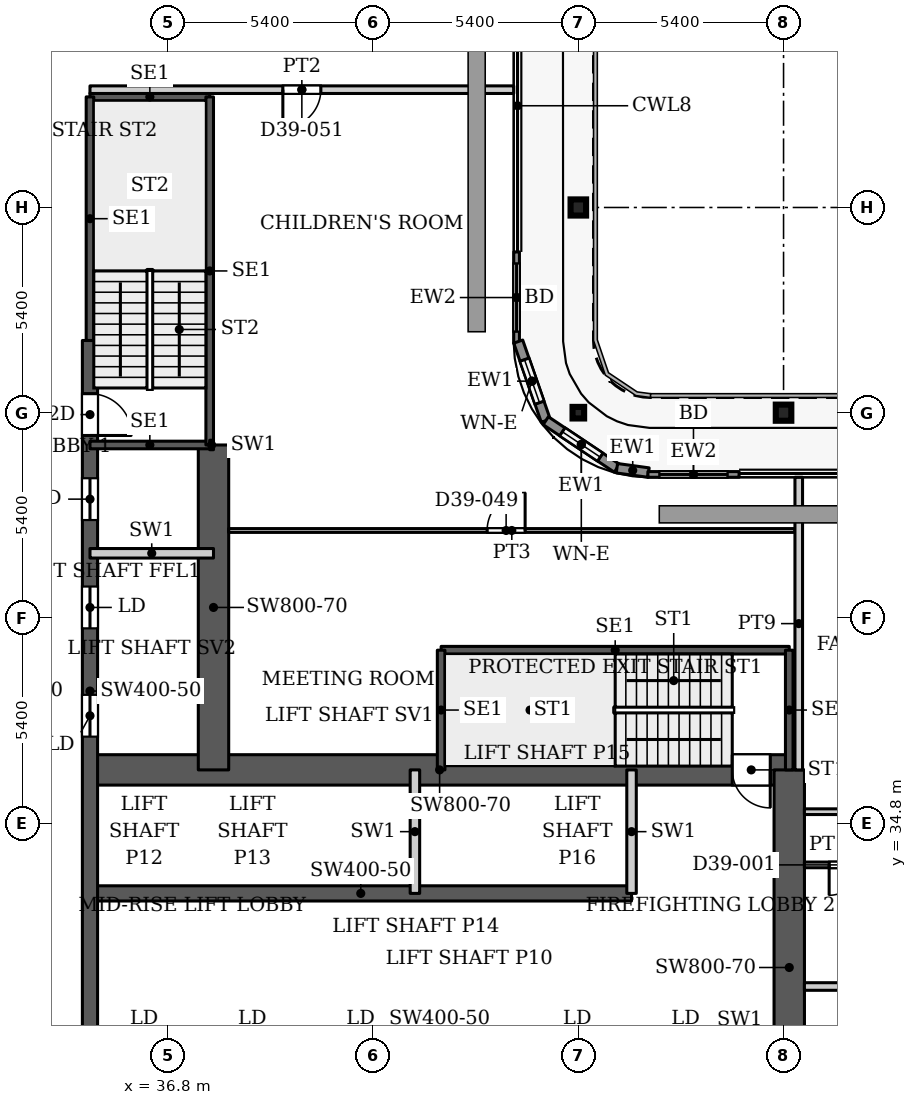
"""IFC4 building model, lengths in metres.
Left out: names, types, materials, properties, quantities, classifications, styles, units other than length and angle.
Written with IfcOpenShell. Run it as: python <this file> out.ifc"""

import sys

from ifc_helpers import new_model, si_unit, direction, frame, frame_2d, origin, origin_2d, place, context, subcontext, project, spatial, rectangle, hollow_rectangle, i_section, extrude, source, transform, mapped, element, fill, save


model = new_model("IFC4")
c1 = context("Model", 3, precision=1e-05, world=origin(), true_north=direction((0.0, 1.0)))
c2 = subcontext(c1, "Body", "Model", "MODEL_VIEW")
j1 = project(units=[si_unit("LENGTHUNIT", "METRE"), si_unit("PLANEANGLEUNIT", "RADIAN")], contexts=[c1])
p1 = place(None, origin())
s1 = spatial("IfcSite", under=j1, at=p1, CompositionType="ELEMENT")
p2 = place(p1, origin())
s2 = spatial("IfcBuilding", under=s1, at=p2, CompositionType="ELEMENT")
p3 = place(p2, frame((0.0, 0.0, 172.1)))
s3 = spatial("IfcBuildingStorey", under=s2, at=p3, CompositionType="ELEMENT", Elevation=172.1)
for number, where, z_axis, x_axis in (
    (1, (53.0, 45.6, 0.0), (0.0, 0.0, 1.0), (1.0, 0.0, 0.0)),
    (2, (47.6, 51.0, 0.0), (0.0, 0.0, 1.0), (1.0, 0.0, 0.0)),
):
    element("IfcColumn", number, at=place(p3, frame(where, z_axis=z_axis, x_axis=x_axis)), inside=s3, PredefinedType="COLUMN", context=c2, shape_type="SweptSolid", body=[
        extrude(i_section(OverallWidth=0.409, OverallDepth=0.425, WebThickness=0.033, FlangeThickness=0.052, FilletRadius=0.013, at=origin_2d()), origin(), (0.0, 0.0, 1.0), 3.9),
    ])
p4 = place(p3, frame((47.6, 45.6, 0.0), z_axis=(0.0, 0.0, 1.0), x_axis=(1.0, 0.0, 0.0)))
e3 = element("IfcColumn", 3, at=p4, inside=s3, PredefinedType="COLUMN", context=c2, shape_type="SweptSolid", body=[
    extrude(hollow_rectangle(XDim=0.305, YDim=0.305, WallThickness=0.016, InnerFilletRadius=0.016, OuterFilletRadius=0.032, at=origin_2d()), origin(), (0.0, 0.0, 1.0), 3.9),
])
p5 = place(p3, frame((34.75, 32.95, 0.0), z_axis=(0.0, 0.0, 1.0), x_axis=(1.0, 0.0, 0.0)))
e4 = element("IfcWall", 4, at=p5, inside=s3, PredefinedType="SHEAR", context=c2, shape_type="SweptSolid", body=[
    extrude(rectangle(XDim=14.25, YDim=0.4, at=frame_2d((7.125, 0.0))), origin(), (0.0, 0.0, 1.0), 3.9),
])
p6 = place(p3, frame((34.75, 36.2, 0.0), z_axis=(0.0, 0.0, 1.0), x_axis=(1.0, 0.0, 0.0)))
e5 = element("IfcWall", 5, at=p6, inside=s3, PredefinedType="SHEAR", context=c2, shape_type="SweptSolid", body=[
    extrude(rectangle(XDim=18.4, YDim=0.8, at=frame_2d((9.2, 0.0))), origin(), (0.0, 0.0, 1.0), 3.9),
])
p7 = place(p6, frame((16.9, 0.0, 0.0)))
e6 = element("IfcOpeningElement", 6, at=p7, cuts=e5, PredefinedType="OPENING", context=c2, shape_type="SweptSolid", body=[
    extrude(rectangle(XDim=1.0, YDim=2.2, at=frame_2d((0.5, 1.1))), frame((0.0, 0.41, 0.0), z_axis=(0.0, -1.0, 0.0), x_axis=(1.0, 0.0, 0.0)), (0.0, 0.0, 1.0), 0.82),
])
p8 = place(p3, frame((34.75, 29.05, 0.0), z_axis=(0.0, 0.0, 1.0), x_axis=(0.0, 1.0, 0.0)))
e7 = element("IfcWall", 7, at=p8, inside=s3, PredefinedType="SHEAR", context=c2, shape_type="SweptSolid", body=[
    extrude(rectangle(XDim=18.45, YDim=0.4, at=frame_2d((9.225, 0.0))), origin(), (0.0, 0.0, 1.0), 3.9),
])
p9 = place(p8, frame((8.025, 0.0, 0.0)))
e8 = element("IfcOpeningElement", 8, at=p9, cuts=e7, PredefinedType="OPENING", context=c2, shape_type="SweptSolid", body=[
    extrude(rectangle(XDim=1.1, YDim=2.2, at=frame_2d((0.55, 1.1))), frame((0.0, 0.21, 0.0), z_axis=(0.0, -1.0, 0.0), x_axis=(1.0, 0.0, 0.0)), (0.0, 0.0, 1.0), 0.42),
])
p10 = place(p8, frame((10.875, 0.0, 0.0)))
e9 = element("IfcOpeningElement", 9, at=p10, cuts=e7, PredefinedType="OPENING", context=c2, shape_type="SweptSolid", body=[
    extrude(rectangle(XDim=1.1, YDim=2.2, at=frame_2d((0.55, 1.1))), frame((0.0, 0.21, 0.0), z_axis=(0.0, -1.0, 0.0), x_axis=(1.0, 0.0, 0.0)), (0.0, 0.0, 1.0), 0.42),
])
p11 = place(p8, frame((13.725, 0.0, 0.0)))
e10 = element("IfcOpeningElement", 10, at=p11, cuts=e7, PredefinedType="OPENING", context=c2, shape_type="SweptSolid", body=[
    extrude(rectangle(XDim=1.1, YDim=2.2, at=frame_2d((0.55, 1.1))), frame((0.0, 0.21, 0.0), z_axis=(0.0, -1.0, 0.0), x_axis=(1.0, 0.0, 0.0)), (0.0, 0.0, 1.0), 0.42),
])
p12 = place(p8, frame((15.95, 0.0, 0.0)))
e11 = element("IfcOpeningElement", 11, at=p12, cuts=e7, PredefinedType="OPENING", context=c2, shape_type="SweptSolid", body=[
    extrude(rectangle(XDim=1.1, YDim=2.2, at=frame_2d((0.55, 1.1))), frame((0.0, 0.21, 0.0), z_axis=(0.0, -1.0, 0.0), x_axis=(1.0, 0.0, 0.0)), (0.0, 0.0, 1.0), 0.42),
])
p13 = place(p3, frame((38.0, 36.2, 0.0), z_axis=(0.0, 0.0, 1.0), x_axis=(0.0, 1.0, 0.0)))
e12 = element("IfcWall", 12, at=p13, inside=s3, PredefinedType="SHEAR", context=c2, shape_type="SweptSolid", body=[
    extrude(rectangle(XDim=8.55, YDim=0.8, at=frame_2d((4.275, 0.0))), origin(), (0.0, 0.0, 1.0), 3.9),
])
p14 = place(p3, frame((53.15, 25.8, 0.0), z_axis=(0.0, 0.0, 1.0), x_axis=(0.0, 1.0, 0.0)))
e13 = element("IfcWall", 13, at=p14, inside=s3, PredefinedType="SHEAR", context=c2, shape_type="SweptSolid", body=[
    extrude(rectangle(XDim=10.4, YDim=0.8, at=frame_2d((5.2, 0.0))), origin(), (0.0, 0.0, 1.0), 3.9),
])
p15 = place(p3, frame((45.975, 49.83, 0.0), z_axis=(0.0, 0.0, 1.0), x_axis=(0.0, -1.0, 0.0)))
e14 = element("IfcWall", 14, at=p15, inside=s3, PredefinedType="SOLIDWALL", context=c2, shape_type="SweptSolid", body=[
    extrude(rectangle(XDim=2.4, YDim=0.15, at=frame_2d((1.2, 0.0))), origin(), (0.0, 0.0, 1.0), 3.75),
])
p16 = place(p15, frame((0.3, 0.0, 0.0)))
e15 = element("IfcOpeningElement", 15, at=p16, cuts=e14, PredefinedType="OPENING", context=c2, shape_type="SweptSolid", body=[
    extrude(rectangle(XDim=1.8, YDim=2.4, at=frame_2d((0.9, 1.2))), frame((0.0, 0.085, 0.0), z_axis=(0.0, -1.0, 0.0), x_axis=(1.0, 0.0, 0.0)), (0.0, 0.0, 1.0), 0.17),
])
p17 = place(p3, frame((46.018, 47.471, 0.0), z_axis=(0.0, 0.0, 1.0), x_axis=(0.328791208903, -0.944402637093, 0.0)))
e16 = element("IfcWall", 16, at=p17, inside=s3, PredefinedType="SOLIDWALL", context=c2, shape_type="SweptSolid", body=[
    extrude(rectangle(XDim=2.205, YDim=0.25, at=frame_2d((1.102, 0.0))), origin(), (0.0, 0.0, 1.0), 3.75),
])
p18 = place(p17, frame((0.503, 0.0, 0.6)))
e17 = element("IfcOpeningElement", 17, at=p18, cuts=e16, PredefinedType="OPENING", context=c2, shape_type="SweptSolid", body=[
    extrude(rectangle(XDim=1.2, YDim=2.1, at=frame_2d((0.6, 1.05))), frame((0.0, 0.135, 0.0), z_axis=(0.0, -1.0, 0.0), x_axis=(1.0, 0.0, 0.0)), (0.0, 0.0, 1.0), 0.27),
])
p19 = place(p3, frame((46.743, 45.389, 0.0), z_axis=(0.0, 0.0, 1.0), x_axis=(0.831449265529, -0.555600682912, 0.0)))
e18 = element("IfcWall", 18, at=p19, inside=s3, PredefinedType="SOLIDWALL", context=c2, shape_type="SweptSolid", body=[
    extrude(rectangle(XDim=2.251, YDim=0.25, at=frame_2d((1.126, 0.0))), origin(), (0.0, 0.0, 1.0), 3.75),
])
p20 = place(p19, frame((0.525, 0.0, 0.6)))
e19 = element("IfcOpeningElement", 19, at=p20, cuts=e18, PredefinedType="OPENING", context=c2, shape_type="SweptSolid", body=[
    extrude(rectangle(XDim=1.2, YDim=2.1, at=frame_2d((0.6, 1.05))), frame((0.0, 0.135, 0.0), z_axis=(0.0, -1.0, 0.0), x_axis=(1.0, 0.0, 0.0)), (0.0, 0.0, 1.0), 0.27),
])
p21 = place(p3, frame((48.615, 44.138, 0.0), z_axis=(0.0, 0.0, 1.0), x_axis=(0.990741504246, -0.135761819977, 0.0)))
e20 = element("IfcWall", 20, at=p21, inside=s3, PredefinedType="SOLIDWALL", context=c2, shape_type="SweptSolid", body=[
    extrude(rectangle(XDim=0.84, YDim=0.25, at=frame_2d((0.42, 0.0))), origin(), (0.0, 0.0, 1.0), 3.75),
])
p22 = place(p3, frame((49.43, 43.975, 0.0), z_axis=(0.0, 0.0, 1.0), x_axis=(1.0, 0.0, 0.0)))
e21 = element("IfcWall", 21, at=p22, inside=s3, PredefinedType="SOLIDWALL", context=c2, shape_type="SweptSolid", body=[
    extrude(rectangle(XDim=2.4, YDim=0.15, at=frame_2d((1.2, 0.0))), origin(), (0.0, 0.0, 1.0), 3.75),
])
p23 = place(p22, frame((0.3, 0.0, 0.0)))
e22 = element("IfcOpeningElement", 22, at=p23, cuts=e21, PredefinedType="OPENING", context=c2, shape_type="SweptSolid", body=[
    extrude(rectangle(XDim=1.8, YDim=2.4, at=frame_2d((0.9, 1.2))), frame((0.0, 0.085, 0.0), z_axis=(0.0, -1.0, 0.0), x_axis=(1.0, 0.0, 0.0)), (0.0, 0.0, 1.0), 0.17),
])
p24 = place(p3, frame((43.99, 39.35, 0.0), z_axis=(0.0, 0.0, 1.0), x_axis=(1.0, 0.0, 0.0)))
e23 = element("IfcWall", 23, at=p24, inside=s3, PredefinedType="SHEAR", context=c2, shape_type="SweptSolid", body=[
    extrude(rectangle(XDim=9.16, YDim=0.2, at=frame_2d((4.58, 0.0))), origin(), (0.0, 0.0, 1.0), 3.9),
])
for number, where, z_axis, x_axis in (
    (24, (43.99, 36.2, 0.0), (0.0, 0.0, 1.0), (0.0, 1.0, 0.0)),
    (25, (53.15, 36.2, 0.0), (0.0, 0.0, 1.0), (0.0, 1.0, 0.0)),
):
    element("IfcWall", number, at=place(p3, frame(where, z_axis=z_axis, x_axis=x_axis)), inside=s3, PredefinedType="SHEAR", context=c2, shape_type="SweptSolid", body=[
        extrude(rectangle(XDim=3.15, YDim=0.2, at=frame_2d((1.575, 0.0))), origin(), (0.0, 0.0, 1.0), 3.9),
    ])
for number, where, z_axis, x_axis in (
    (26, (34.75, 44.75, 0.0), (0.0, 0.0, 1.0), (1.0, 0.0, 0.0)),
    (27, (34.75, 53.91, 0.0), (0.0, 0.0, 1.0), (1.0, 0.0, 0.0)),
):
    element("IfcWall", number, at=place(p3, frame(where, z_axis=z_axis, x_axis=x_axis)), inside=s3, PredefinedType="SHEAR", context=c2, shape_type="SweptSolid", body=[
        extrude(rectangle(XDim=3.15, YDim=0.2, at=frame_2d((1.575, 0.0))), origin(), (0.0, 0.0, 1.0), 3.9),
    ])
p25 = place(p3, frame((34.75, 47.5, 0.0), z_axis=(0.0, 0.0, 1.0), x_axis=(0.0, 1.0, 0.0)))
e28 = element("IfcWall", 28, at=p25, inside=s3, PredefinedType="SHEAR", context=c2, shape_type="SweptSolid", body=[
    extrude(rectangle(XDim=6.41, YDim=0.2, at=frame_2d((3.205, 0.0))), origin(), (0.0, 0.0, 1.0), 3.9),
])
p26 = place(p3, frame((37.9, 44.75, 0.0), z_axis=(0.0, 0.0, 1.0), x_axis=(0.0, 1.0, 0.0)))
e29 = element("IfcWall", 29, at=p26, inside=s3, PredefinedType="SHEAR", context=c2, shape_type="SweptSolid", body=[
    extrude(rectangle(XDim=9.16, YDim=0.2, at=frame_2d((4.58, 0.0))), origin(), (0.0, 0.0, 1.0), 3.9),
])
for number, where, z_axis, x_axis in (
    (30, (43.3, 32.95, 0.0), (0.0, 0.0, 1.0), (0.0, 1.0, 0.0)),
    (31, (49.0, 32.95, 0.0), (0.0, 0.0, 1.0), (0.0, 1.0, 0.0)),
    (32, (34.75, 41.9, 0.0), (0.0, 0.0, 1.0), (1.0, 0.0, 0.0)),
):
    element("IfcWall", number, at=place(p3, frame(where, z_axis=z_axis, x_axis=x_axis)), inside=s3, PredefinedType="PARTITIONING", context=c2, shape_type="SweptSolid", body=[
        extrude(rectangle(XDim=3.25, YDim=0.25, at=frame_2d((1.625, 0.0))), origin(), (0.0, 0.0, 1.0), 3.9),
    ])
p27 = place(p3, frame((37.9, 44.75, 0.0), z_axis=(0.0, 0.0, 1.0), x_axis=(1.0, 0.0, 0.0)))
e33 = element("IfcWall", 33, at=p27, inside=s3, PredefinedType="PARTITIONING", context=c2, shape_type="SweptSolid", body=[
    extrude(rectangle(XDim=0.1, YDim=0.25, at=frame_2d((0.05, 0.0))), origin(), (0.0, 0.0, 1.0), 3.9),
])
p28 = place(p3, frame((34.75, 54.1, 0.0), z_axis=(0.0, 0.0, 1.0), x_axis=(1.0, 0.0, 0.0)))
e34 = element("IfcWall", 34, at=p28, inside=s3, PredefinedType="PARTITIONING", context=c2, shape_type="SweptSolid", body=[
    extrude(rectangle(XDim=11.15, YDim=0.2, at=frame_2d((5.575, 0.0))), origin(), (0.0, 0.0, 1.0), 3.6),
])
p29 = place(p28, frame((5.075, 0.0, 0.0)))
e35 = element("IfcOpeningElement", 35, at=p29, cuts=e34, PredefinedType="OPENING", context=c2, shape_type="SweptSolid", body=[
    extrude(rectangle(XDim=1.0, YDim=2.1, at=frame_2d((0.5, 1.05))), frame((0.0, 0.11, 0.0), z_axis=(0.0, -1.0, 0.0), x_axis=(1.0, 0.0, 0.0)), (0.0, 0.0, 1.0), 0.22),
])
p30 = place(p3, frame((38.399, 42.5, 0.0), z_axis=(0.0, 0.0, 1.0), x_axis=(1.0, 0.0, 0.0)))
e36 = element("IfcWall", 36, at=p30, inside=s3, PredefinedType="PARTITIONING", context=c2, shape_type="SweptSolid", body=[
    extrude(rectangle(XDim=14.901, YDim=0.1, at=frame_2d((7.451, 0.0))), origin(), (0.0, 0.0, 1.0), 3.6),
])
p31 = place(p30, frame((6.801, 0.0, 0.0)))
e37 = element("IfcOpeningElement", 37, at=p31, cuts=e36, PredefinedType="OPENING", context=c2, shape_type="SweptSolid", body=[
    extrude(rectangle(XDim=1.0, YDim=2.1, at=frame_2d((0.5, 1.05))), frame((0.0, 0.06, 0.0), z_axis=(0.0, -1.0, 0.0), x_axis=(1.0, 0.0, 0.0)), (0.0, 0.0, 1.0), 0.12),
])
p32 = place(p3, frame((53.4, 36.199, 0.0), z_axis=(0.0, 0.0, 1.0), x_axis=(0.0, 1.0, 0.0)))
e38 = element("IfcWall", 38, at=p32, inside=s3, PredefinedType="PARTITIONING", context=c2, shape_type="SweptSolid", body=[
    extrude(rectangle(XDim=7.701, YDim=0.2, at=frame_2d((3.851, 0.0))), origin(), (0.0, 0.0, 1.0), 3.6),
])
p33 = place(p3, frame((53.549, 30.5, 0.0), z_axis=(0.0, 0.0, 1.0), x_axis=(1.0, 0.0, 0.0)))
e39 = element("IfcWall", 39, at=p33, inside=s3, PredefinedType="PARTITIONING", context=c2, shape_type="SweptSolid", body=[
    extrude(rectangle(XDim=39.151, YDim=0.2, at=frame_2d((19.575, 0.0))), origin(), (0.0, 0.0, 1.0), 3.6),
])
p34 = place(p33, frame((2.801, 0.0, 0.0)))
e40 = element("IfcOpeningElement", 40, at=p34, cuts=e39, PredefinedType="OPENING", context=c2, shape_type="SweptSolid", body=[
    extrude(rectangle(XDim=1.0, YDim=2.1, at=frame_2d((0.5, 1.05))), frame((0.0, 0.11, 0.0), z_axis=(0.0, -1.0, 0.0), x_axis=(1.0, 0.0, 0.0)), (0.0, 0.0, 1.0), 0.22),
])
p35 = place(p33, frame((9.851, 0.0, 0.0)))
e41 = element("IfcOpeningElement", 41, at=p35, cuts=e39, PredefinedType="OPENING", context=c2, shape_type="SweptSolid", body=[
    extrude(rectangle(XDim=1.0, YDim=2.1, at=frame_2d((0.5, 1.05))), frame((0.0, 0.11, 0.0), z_axis=(0.0, -1.0, 0.0), x_axis=(1.0, 0.0, 0.0)), (0.0, 0.0, 1.0), 0.22),
])
p36 = place(p33, frame((28.751, 0.0, 0.0)))
e42 = element("IfcOpeningElement", 42, at=p36, cuts=e39, PredefinedType="OPENING", context=c2, shape_type="SweptSolid", body=[
    extrude(rectangle(XDim=1.0, YDim=2.1, at=frame_2d((0.5, 1.05))), frame((0.0, 0.11, 0.0), z_axis=(0.0, -1.0, 0.0), x_axis=(1.0, 0.0, 0.0)), (0.0, 0.0, 1.0), 0.22),
])
p37 = place(p33, frame((32.651, 0.0, 0.0)))
e43 = element("IfcOpeningElement", 43, at=p37, cuts=e39, PredefinedType="OPENING", context=c2, shape_type="SweptSolid", body=[
    extrude(rectangle(XDim=1.0, YDim=2.1, at=frame_2d((0.5, 1.05))), frame((0.0, 0.11, 0.0), z_axis=(0.0, -1.0, 0.0), x_axis=(1.0, 0.0, 0.0)), (0.0, 0.0, 1.0), 0.22),
])
p38 = place(p3, frame((53.549, 33.7, 0.0), z_axis=(0.0, 0.0, 1.0), x_axis=(1.0, 0.0, 0.0)))
e44 = element("IfcWall", 44, at=p38, inside=s3, PredefinedType="PARTITIONING", context=c2, shape_type="SweptSolid", body=[
    extrude(rectangle(XDim=2.176, YDim=0.15, at=frame_2d((1.088, 0.0))), origin(), (0.0, 0.0, 1.0), 3.6),
])
p39 = place(p38, frame((0.651, 0.0, 0.0)))
e45 = element("IfcOpeningElement", 45, at=p39, cuts=e44, PredefinedType="OPENING", context=c2, shape_type="SweptSolid", body=[
    extrude(rectangle(XDim=0.8, YDim=2.1, at=frame_2d((0.4, 1.05))), frame((0.0, 0.085, 0.0), z_axis=(0.0, -1.0, 0.0), x_axis=(1.0, 0.0, 0.0)), (0.0, 0.0, 1.0), 0.17),
])
p40 = place(p3, frame((53.549, 35.1, 0.0), z_axis=(0.0, 0.0, 1.0), x_axis=(1.0, 0.0, 0.0)))
e46 = element("IfcWall", 46, at=p40, inside=s3, PredefinedType="PARTITIONING", context=c2, shape_type="SweptSolid", body=[
    extrude(rectangle(XDim=9.351, YDim=0.15, at=frame_2d((4.675, 0.0))), origin(), (0.0, 0.0, 1.0), 3.6),
])
p41 = place(p40, frame((7.351, 0.0, 0.0)))
e47 = element("IfcOpeningElement", 47, at=p41, cuts=e46, PredefinedType="OPENING", context=c2, shape_type="SweptSolid", body=[
    extrude(rectangle(XDim=0.9, YDim=2.1, at=frame_2d((0.45, 1.05))), frame((0.0, 0.085, 0.0), z_axis=(0.0, -1.0, 0.0), x_axis=(1.0, 0.0, 0.0)), (0.0, 0.0, 1.0), 0.17),
])
p42 = place(p40, frame((2.501, 0.0, 0.0)))
e48 = element("IfcOpeningElement", 48, at=p42, cuts=e46, PredefinedType="OPENING", context=c2, shape_type="SweptSolid", body=[
    extrude(rectangle(XDim=1.0, YDim=2.1, at=frame_2d((0.5, 1.05))), frame((0.0, 0.085, 0.0), z_axis=(0.0, -1.0, 0.0), x_axis=(1.0, 0.0, 0.0)), (0.0, 0.0, 1.0), 0.17),
])
m1 = source(origin(), c2, "Body", "SweptSolid", [
    extrude(rectangle(XDim=1.8, YDim=2.4, at=frame_2d((0.9, 1.2))), frame((0.0, 0.025, 0.0), z_axis=(0.0, -1.0, 0.0), x_axis=(1.0, 0.0, 0.0)), (0.0, 0.0, 1.0), 0.05),
])
p43 = place(p16, origin())
e49 = element("IfcDoor", 49, at=p43, inside=s3, OperationType="SLIDING_TO_LEFT", PredefinedType="DOOR", context=c2, shape_type="MappedRepresentation", body=[
    mapped(m1, transform((0.0, 0.0, 0.0), x_axis=(1.0, 0.0, 0.0), y_axis=(0.0, 1.0, 0.0), z_axis=(0.0, 0.0, 1.0), scale=1.0)),
])
fill(e15, e49)
m2 = source(origin(), c2, "Body", "SweptSolid", [
    extrude(rectangle(XDim=1.2, YDim=2.1, at=frame_2d((0.6, 1.05))), frame((0.0, 0.03, 0.0), z_axis=(0.0, -1.0, 0.0), x_axis=(1.0, 0.0, 0.0)), (0.0, 0.0, 1.0), 0.06),
])
p44 = place(p18, origin())
e50 = element("IfcWindow", 50, at=p44, inside=s3, PartitioningType="SINGLE_PANEL", PredefinedType="WINDOW", context=c2, shape_type="MappedRepresentation", body=[
    mapped(m2, transform((0.0, 0.0, 0.0), x_axis=(1.0, 0.0, 0.0), y_axis=(0.0, 1.0, 0.0), z_axis=(0.0, 0.0, 1.0), scale=1.0)),
])
fill(e17, e50)
p45 = place(p20, origin())
e51 = element("IfcWindow", 51, at=p45, inside=s3, PartitioningType="SINGLE_PANEL", PredefinedType="WINDOW", context=c2, shape_type="MappedRepresentation", body=[
    mapped(m2, transform((0.0, 0.0, 0.0), x_axis=(1.0, 0.0, 0.0), y_axis=(0.0, 1.0, 0.0), z_axis=(0.0, 0.0, 1.0), scale=1.0)),
])
fill(e19, e51)
p46 = place(p23, origin())
e52 = element("IfcDoor", 52, at=p46, inside=s3, OperationType="SLIDING_TO_LEFT", PredefinedType="DOOR", context=c2, shape_type="MappedRepresentation", body=[
    mapped(m1, transform((0.0, 0.0, 0.0), x_axis=(1.0, 0.0, 0.0), y_axis=(0.0, 1.0, 0.0), z_axis=(0.0, 0.0, 1.0), scale=1.0)),
])
fill(e22, e52)
m3 = source(origin(), c2, "Body", "SweptSolid", [
    extrude(rectangle(XDim=1.1, YDim=2.2, at=frame_2d((0.55, 1.1))), frame((0.0, 0.025, 0.0), z_axis=(0.0, -1.0, 0.0), x_axis=(1.0, 0.0, 0.0)), (0.0, 0.0, 1.0), 0.05),
])
p47 = place(p9, origin())
e53 = element("IfcDoor", 53, at=p47, inside=s3, OperationType="SLIDING_TO_LEFT", PredefinedType="DOOR", context=c2, shape_type="MappedRepresentation", body=[
    mapped(m3, transform((0.0, 0.0, 0.0), x_axis=(1.0, 0.0, 0.0), y_axis=(0.0, 1.0, 0.0), z_axis=(0.0, 0.0, 1.0), scale=1.0)),
])
fill(e8, e53)
p48 = place(p10, origin())
e54 = element("IfcDoor", 54, at=p48, inside=s3, OperationType="SLIDING_TO_LEFT", PredefinedType="DOOR", context=c2, shape_type="MappedRepresentation", body=[
    mapped(m3, transform((0.0, 0.0, 0.0), x_axis=(1.0, 0.0, 0.0), y_axis=(0.0, 1.0, 0.0), z_axis=(0.0, 0.0, 1.0), scale=1.0)),
])
fill(e9, e54)
p49 = place(p11, origin())
e55 = element("IfcDoor", 55, at=p49, inside=s3, OperationType="SLIDING_TO_LEFT", PredefinedType="DOOR", context=c2, shape_type="MappedRepresentation", body=[
    mapped(m3, transform((0.0, 0.0, 0.0), x_axis=(1.0, 0.0, 0.0), y_axis=(0.0, 1.0, 0.0), z_axis=(0.0, 0.0, 1.0), scale=1.0)),
])
fill(e10, e55)
m4 = source(origin(), c2, "Body", "SweptSolid", [
    extrude(rectangle(XDim=1.0, YDim=2.2, at=frame_2d((0.5, 1.1))), frame((0.0, 0.025, 0.0), z_axis=(0.0, -1.0, 0.0), x_axis=(1.0, 0.0, 0.0)), (0.0, 0.0, 1.0), 0.05),
])
p50 = place(p7, origin())
e56 = element("IfcDoor", 56, at=p50, inside=s3, OperationType="SINGLE_SWING_RIGHT", PredefinedType="DOOR", context=c2, shape_type="MappedRepresentation", body=[
    mapped(m4, transform((0.0, 0.0, 0.0), x_axis=(1.0, 0.0, 0.0), y_axis=(0.0, 1.0, 0.0), z_axis=(0.0, 0.0, 1.0), scale=1.0)),
])
fill(e6, e56)
m5 = source(origin(), c2, "Body", "SweptSolid", [
    extrude(rectangle(XDim=1.1, YDim=2.2, at=frame_2d((0.55, 1.1))), frame((0.0, 0.025, 0.0), z_axis=(0.0, -1.0, 0.0), x_axis=(1.0, 0.0, 0.0)), (0.0, 0.0, 1.0), 0.05),
])
p51 = place(p12, origin())
e57 = element("IfcDoor", 57, at=p51, inside=s3, OperationType="SINGLE_SWING_RIGHT", PredefinedType="DOOR", context=c2, shape_type="MappedRepresentation", body=[
    mapped(m5, transform((0.0, 0.0, 0.0), x_axis=(1.0, 0.0, 0.0), y_axis=(0.0, 1.0, 0.0), z_axis=(0.0, 0.0, 1.0), scale=1.0)),
])
fill(e11, e57)
m6 = source(origin(), c2, "Body", "SweptSolid", [
    extrude(rectangle(XDim=0.8, YDim=2.1, at=frame_2d((0.4, 1.05))), frame((0.0, 0.025, 0.0), z_axis=(0.0, -1.0, 0.0), x_axis=(1.0, 0.0, 0.0)), (0.0, 0.0, 1.0), 0.05),
])
p52 = place(p39, origin())
e58 = element("IfcDoor", 58, at=p52, inside=s3, OperationType="SINGLE_SWING_RIGHT", PredefinedType="DOOR", context=c2, shape_type="MappedRepresentation", body=[
    mapped(m6, transform((0.0, 0.0, 0.0), x_axis=(1.0, 0.0, 0.0), y_axis=(0.0, 1.0, 0.0), z_axis=(0.0, 0.0, 1.0), scale=1.0)),
])
fill(e45, e58)
m7 = source(origin(), c2, "Body", "SweptSolid", [
    extrude(rectangle(XDim=1.0, YDim=2.1, at=frame_2d((0.5, 1.05))), frame((0.0, 0.025, 0.0), z_axis=(0.0, -1.0, 0.0), x_axis=(1.0, 0.0, 0.0)), (0.0, 0.0, 1.0), 0.05),
])
p53 = place(p31, origin())
e59 = element("IfcDoor", 59, at=p53, inside=s3, OperationType="SINGLE_SWING_LEFT", PredefinedType="DOOR", context=c2, shape_type="MappedRepresentation", body=[
    mapped(m7, transform((0.0, 0.0, 0.0), x_axis=(1.0, 0.0, 0.0), y_axis=(0.0, 1.0, 0.0), z_axis=(0.0, 0.0, 1.0), scale=1.0)),
])
fill(e37, e59)
m8 = source(origin(), c2, "Body", "SweptSolid", [
    extrude(rectangle(XDim=1.0, YDim=2.1, at=frame_2d((0.5, 1.05))), frame((0.0, 0.025, 0.0), z_axis=(0.0, -1.0, 0.0), x_axis=(1.0, 0.0, 0.0)), (0.0, 0.0, 1.0), 0.05),
])
p54 = place(p29, origin())
e60 = element("IfcDoor", 60, at=p54, inside=s3, OperationType="SINGLE_SWING_RIGHT", PredefinedType="DOOR", context=c2, shape_type="MappedRepresentation", body=[
    mapped(m8, transform((0.0, 0.0, 0.0), x_axis=(1.0, 0.0, 0.0), y_axis=(0.0, 1.0, 0.0), z_axis=(0.0, 0.0, 1.0), scale=1.0)),
])
fill(e35, e60)
save(model, sys.argv[1])
